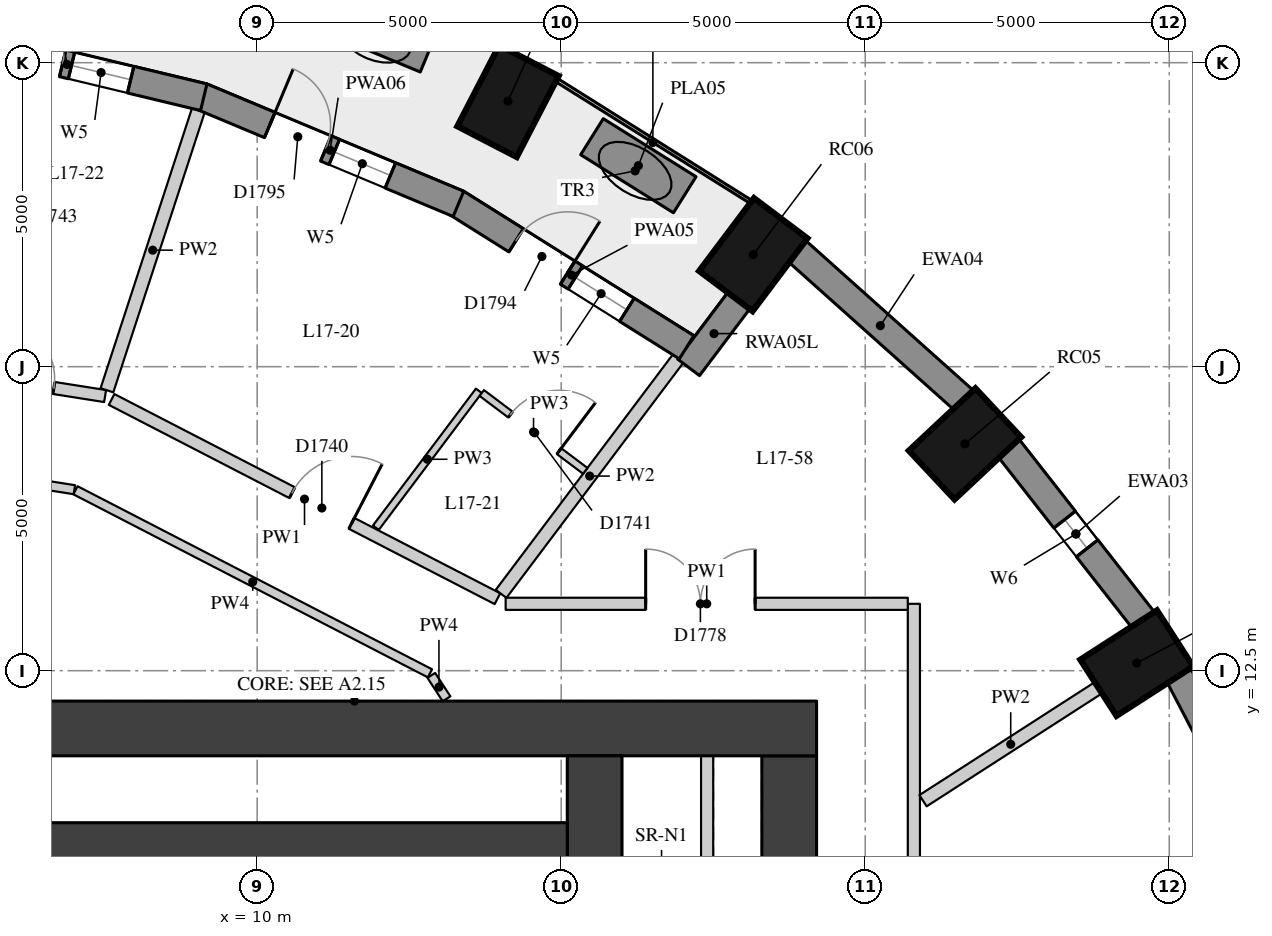
"""IFC4 building model, lengths in metres.
Left out: names, types, materials, properties, quantities, classifications, styles, units other than length and angle.
Written with IfcOpenShell. Run it as: python <this file> out.ifc"""

import sys

from ifc_helpers import new_model, si_unit, direction, frame, frame_2d, origin, origin_2d, place, context, subcontext, project, spatial, rectangle, extrude, element, fill, save


model = new_model("IFC4")
c1 = context("Model", 3, precision=1e-05, world=origin(), true_north=direction((0.0, 1.0)))
c2 = subcontext(c1, "Body", "Model", "MODEL_VIEW")
j1 = project(units=[si_unit("LENGTHUNIT", "METRE"), si_unit("PLANEANGLEUNIT", "RADIAN")], contexts=[c1])
p1 = place(None, origin())
s1 = spatial("IfcSite", under=j1, at=p1, CompositionType="ELEMENT")
p2 = place(p1, origin())
s2 = spatial("IfcBuilding", under=s1, at=p2, CompositionType="ELEMENT")
p3 = place(p2, frame((0.0, 0.0, 64.6)))
s3 = spatial("IfcBuildingStorey", under=s2, at=p3, CompositionType="ELEMENT", Elevation=64.6)
for number, where, z_axis, x_axis in (
    (1, (24.465, 12.625, 0.0), (0.0, 0.0, 1.0), (0.841, 0.541, 0.0)),
    (2, (21.641, 16.23, 0.0), (0.0, 0.0, 1.0), (0.73, 0.683, 0.0)),
    (3, (18.159, 19.343, 0.0), (0.0, 0.0, 1.0), (0.601, 0.799, 0.0)),
    (4, (14.125, 21.867, 0.0), (0.0, 0.0, 1.0), (0.46, 0.888, 0.0)),
):
    element("IfcColumn", number, at=place(p3, frame(where, z_axis=z_axis, x_axis=x_axis)), inside=s3, PredefinedType="COLUMN", context=c2, shape_type="SweptSolid", body=[
        extrude(rectangle(XDim=1.5, YDim=1.1, at=origin_2d()), origin(), (0.0, 0.0, 1.0), 3.3),
    ])
p4 = place(p3, frame((26.786, 9.305, 0.0), z_axis=(0.0, 0.0, 1.0), x_axis=(-0.462492775226, 0.886623050041, 0.0)))
e5 = element("IfcWall", 5, at=p4, inside=s3, PredefinedType="SOLIDWALL", context=c2, shape_type="SweptSolid", body=[
    extrude(rectangle(XDim=3.532, YDim=0.45, at=frame_2d((1.766, 0.0))), origin(), (0.0, 0.0, 1.0), 3.02),
])
p5 = place(p3, frame((24.578, 13.328, 0.0), z_axis=(0.0, 0.0, 1.0), x_axis=(-0.616661975264, 0.787228053529, 0.0)))
e6 = element("IfcWall", 6, at=p5, inside=s3, PredefinedType="SOLIDWALL", context=c2, shape_type="SweptSolid", body=[
    extrude(rectangle(XDim=3.61, YDim=0.45, at=frame_2d((1.805, 0.0))), origin(), (0.0, 0.0, 1.0), 3.02),
])
p6 = place(p5, frame((1.505, 0.0, 0.4)))
e7 = element("IfcOpeningElement", 7, at=p6, cuts=e6, PredefinedType="OPENING", context=c2, shape_type="SweptSolid", body=[
    extrude(rectangle(XDim=0.6, YDim=1.75, at=frame_2d((0.3, 0.875))), frame((0.0, 0.235, 0.0), z_axis=(0.0, -1.0, 0.0), x_axis=(1.0, 0.0, 0.0)), (0.0, 0.0, 1.0), 0.47),
])
p7 = place(p3, frame((21.627, 16.943, 0.0), z_axis=(0.0, 0.0, 1.0), x_axis=(-0.745526233716, 0.66647628228, 0.0)))
e8 = element("IfcWall", 8, at=p7, inside=s3, PredefinedType="SOLIDWALL", context=c2, shape_type="SweptSolid", body=[
    extrude(rectangle(XDim=3.697, YDim=0.45, at=frame_2d((1.848, 0.0))), origin(), (0.0, 0.0, 1.0), 3.02),
])
p8 = place(p3, frame((17.932, 18.6, 0.0), z_axis=(0.0, 0.0, 1.0), x_axis=(-0.601262851241, -0.799051302306, 0.0)))
e9 = element("IfcWall", 9, at=p8, inside=s3, PredefinedType="SOLIDWALL", context=c2, shape_type="SweptSolid", body=[
    extrude(rectangle(XDim=1.391, YDim=0.45, at=frame_2d((0.696, 0.0))), origin(), (0.0, 0.0, 1.0), 3.02),
])
p9 = place(p3, frame((17.062, 17.819, 0.0), z_axis=(0.0, 0.0, 1.0), x_axis=(-0.846990101364, 0.531608660757, 0.0)))
e10 = element("IfcWall", 10, at=p9, inside=s3, PredefinedType="SOLIDWALL", context=c2, shape_type="SweptSolid", body=[
    extrude(rectangle(XDim=4.469, YDim=0.45, at=frame_2d((2.234, 0.0))), origin(), (0.0, 0.0, 1.0), 3.02),
])
p10 = place(p9, frame((1.159, 0.0, 0.4)))
e11 = element("IfcOpeningElement", 11, at=p10, cuts=e10, PredefinedType="OPENING", context=c2, shape_type="SweptSolid", body=[
    extrude(rectangle(XDim=1.0, YDim=1.75, at=frame_2d((0.5, 0.875))), frame((0.0, 0.235, 0.0), z_axis=(0.0, -1.0, 0.0), x_axis=(1.0, 0.0, 0.0)), (0.0, 0.0, 1.0), 0.47),
])
p11 = place(p9, frame((2.31, 0.0, 0.0)))
e12 = element("IfcOpeningElement", 12, at=p11, cuts=e10, PredefinedType="OPENING", context=c2, shape_type="SweptSolid", body=[
    extrude(rectangle(XDim=1.0, YDim=2.15, at=frame_2d((0.5, 1.075))), frame((0.0, 0.235, 0.0), z_axis=(0.0, -1.0, 0.0), x_axis=(1.0, 0.0, 0.0)), (0.0, 0.0, 1.0), 0.47),
])
p12 = place(p3, frame((13.31, 20.178, 0.0), z_axis=(0.0, 0.0, 1.0), x_axis=(-0.922634412489, 0.385675693935, 0.0)))
e13 = element("IfcWall", 13, at=p12, inside=s3, PredefinedType="SOLIDWALL", context=c2, shape_type="SweptSolid", body=[
    extrude(rectangle(XDim=4.577, YDim=0.45, at=frame_2d((2.288, 0.0))), origin(), (0.0, 0.0, 1.0), 3.02),
])
p13 = place(p12, frame((1.213, 0.0, 0.4)))
e14 = element("IfcOpeningElement", 14, at=p13, cuts=e13, PredefinedType="OPENING", context=c2, shape_type="SweptSolid", body=[
    extrude(rectangle(XDim=1.0, YDim=1.75, at=frame_2d((0.5, 0.875))), frame((0.0, 0.235, 0.0), z_axis=(0.0, -1.0, 0.0), x_axis=(1.0, 0.0, 0.0)), (0.0, 0.0, 1.0), 0.47),
])
p14 = place(p12, frame((2.363, 0.0, 0.0)))
e15 = element("IfcOpeningElement", 15, at=p14, cuts=e13, PredefinedType="OPENING", context=c2, shape_type="SweptSolid", body=[
    extrude(rectangle(XDim=1.0, YDim=2.15, at=frame_2d((0.5, 1.075))), frame((0.0, 0.235, 0.0), z_axis=(0.0, -1.0, 0.0), x_axis=(1.0, 0.0, 0.0)), (0.0, 0.0, 1.0), 0.47),
])
p15 = place(p3, frame((9.122, 21.932, 0.0), z_axis=(0.0, 0.0, 1.0), x_axis=(-0.972346547441, 0.233542697764, 0.0)))
e16 = element("IfcWall", 16, at=p15, inside=s3, PredefinedType="SOLIDWALL", context=c2, shape_type="SweptSolid", body=[
    extrude(rectangle(XDim=4.624, YDim=0.45, at=frame_2d((2.312, 0.0))), origin(), (0.0, 0.0, 1.0), 3.02),
])
p16 = place(p15, frame((1.237, 0.0, 0.4)))
e17 = element("IfcOpeningElement", 17, at=p16, cuts=e16, PredefinedType="OPENING", context=c2, shape_type="SweptSolid", body=[
    extrude(rectangle(XDim=1.0, YDim=1.75, at=frame_2d((0.5, 0.875))), frame((0.0, 0.235, 0.0), z_axis=(0.0, -1.0, 0.0), x_axis=(1.0, 0.0, 0.0)), (0.0, 0.0, 1.0), 0.47),
])
p17 = place(p15, frame((2.387, 0.0, 0.0)))
e18 = element("IfcOpeningElement", 18, at=p17, cuts=e16, PredefinedType="OPENING", context=c2, shape_type="SweptSolid", body=[
    extrude(rectangle(XDim=1.0, YDim=2.15, at=frame_2d((0.5, 1.075))), frame((0.0, 0.235, 0.0), z_axis=(0.0, -1.0, 0.0), x_axis=(1.0, 0.0, 0.0)), (0.0, 0.0, 1.0), 0.47),
])
p18 = place(p3, frame((17.032, 20.328, 0.0), z_axis=(0.0, 0.0, 1.0), x_axis=(-0.847609446823, 0.530620604252, 0.0)))
e19 = element("IfcWall", 19, at=p18, inside=s3, PredefinedType="USERDEFINED", context=c2, shape_type="SweptSolid", body=[
    extrude(rectangle(XDim=1.8, YDim=0.7, at=frame_2d((0.9, 0.0))), origin(), (0.0, 0.0, 1.0), 0.75),
])
p19 = place(p3, frame((12.817, 22.67, 0.0), z_axis=(0.0, 0.0, 1.0), x_axis=(-0.923000660042, 0.384798364811, 0.0)))
e20 = element("IfcWall", 20, at=p19, inside=s3, PredefinedType="USERDEFINED", context=c2, shape_type="SweptSolid", body=[
    extrude(rectangle(XDim=1.8, YDim=0.7, at=frame_2d((0.9, 0.0))), origin(), (0.0, 0.0, 1.0), 0.75),
])
p20 = place(p3, frame((18.75, -11.1, 0.0), z_axis=(0.0, 0.0, 1.0), x_axis=(0.0, 1.0, 0.0)))
e21 = element("IfcWall", 21, at=p20, inside=s3, PredefinedType="SHEAR", context=c2, shape_type="SweptSolid", body=[
    extrude(rectangle(XDim=22.2, YDim=0.9, at=frame_2d((11.1, 0.0))), origin(), (0.0, 0.0, 1.0), 3.02),
])
p21 = place(p20, frame((16.175, 0.0, 0.0)))
e22 = element("IfcOpeningElement", 22, at=p21, cuts=e21, PredefinedType="OPENING", context=c2, shape_type="SweptSolid", body=[
    extrude(rectangle(XDim=1.5, YDim=2.1, at=frame_2d((0.75, 1.05))), frame((0.0, 0.46, 0.0), z_axis=(0.0, -1.0, 0.0), x_axis=(1.0, 0.0, 0.0)), (0.0, 0.0, 1.0), 0.92),
])
p22 = place(p20, frame((5.025, 0.0, 0.0)))
e23 = element("IfcOpeningElement", 23, at=p22, cuts=e21, PredefinedType="OPENING", context=c2, shape_type="SweptSolid", body=[
    extrude(rectangle(XDim=1.5, YDim=2.1, at=frame_2d((0.75, 1.05))), frame((0.0, 0.46, 0.0), z_axis=(0.0, -1.0, 0.0), x_axis=(1.0, 0.0, 0.0)), (0.0, 0.0, 1.0), 0.92),
])
p23 = place(p3, frame((4.0, 11.55, 0.0), z_axis=(0.0, 0.0, 1.0), x_axis=(1.0, 0.0, 0.0)))
e24 = element("IfcWall", 24, at=p23, inside=s3, PredefinedType="SHEAR", context=c2, shape_type="SweptSolid", body=[
    extrude(rectangle(XDim=15.2, YDim=0.9, at=frame_2d((7.6, 0.0))), origin(), (0.0, 0.0, 1.0), 3.02),
])
p24 = place(p3, frame((15.55, -11.1, 0.0), z_axis=(0.0, 0.0, 1.0), x_axis=(0.0, 1.0, 0.0)))
e25 = element("IfcWall", 25, at=p24, inside=s3, PredefinedType="SHEAR", context=c2, shape_type="SweptSolid", body=[
    extrude(rectangle(XDim=22.2, YDim=0.9, at=frame_2d((11.1, 0.0))), origin(), (0.0, 0.0, 1.0), 3.02),
])
p25 = place(p24, frame((15.6, 0.0, 0.0)))
e26 = element("IfcOpeningElement", 26, at=p25, cuts=e25, PredefinedType="OPENING", context=c2, shape_type="SweptSolid", body=[
    extrude(rectangle(XDim=1.0, YDim=2.1, at=frame_2d((0.5, 1.05))), frame((0.0, 0.46, 0.0), z_axis=(0.0, -1.0, 0.0), x_axis=(1.0, 0.0, 0.0)), (0.0, 0.0, 1.0), 0.92),
])
p26 = place(p24, frame((5.6, 0.0, 0.0)))
e27 = element("IfcOpeningElement", 27, at=p26, cuts=e25, PredefinedType="OPENING", context=c2, shape_type="SweptSolid", body=[
    extrude(rectangle(XDim=1.0, YDim=2.1, at=frame_2d((0.5, 1.05))), frame((0.0, 0.46, 0.0), z_axis=(0.0, -1.0, 0.0), x_axis=(1.0, 0.0, 0.0)), (0.0, 0.0, 1.0), 0.92),
])
p27 = place(p3, frame((4.9, 9.55, 0.0), z_axis=(0.0, 0.0, 1.0), x_axis=(1.0, 0.0, 0.0)))
e28 = element("IfcWall", 28, at=p27, inside=s3, PredefinedType="SHEAR", context=c2, shape_type="SweptSolid", body=[
    extrude(rectangle(XDim=10.2, YDim=0.9, at=frame_2d((5.1, 0.0))), origin(), (0.0, 0.0, 1.0), 3.02),
])
p28 = place(p3, frame((17.4, 7.4, 0.0), z_axis=(0.0, 0.0, 1.0), x_axis=(0.0, 1.0, 0.0)))
e29 = element("IfcWall", 29, at=p28, inside=s3, PredefinedType="PARTITIONING", context=c2, shape_type="SweptSolid", body=[
    extrude(rectangle(XDim=3.7, YDim=0.2, at=frame_2d((1.85, 0.0))), origin(), (0.0, 0.0, 1.0), 3.02),
])
p29 = place(p3, frame((20.8, 13.6, 0.0), z_axis=(0.0, 0.0, 1.0), x_axis=(0.0, -1.0, 0.0)))
e30 = element("IfcWall", 30, at=p29, inside=s3, PredefinedType="PARTITIONING", context=c2, shape_type="SweptSolid", body=[
    extrude(rectangle(XDim=10.428, YDim=0.2, at=frame_2d((5.214, 0.0))), origin(), (0.0, 0.0, 1.0), 3.02),
])
p30 = place(p29, frame((5.976, 0.0, 0.0)))
e31 = element("IfcOpeningElement", 31, at=p30, cuts=e30, PredefinedType="OPENING", context=c2, shape_type="SweptSolid", body=[
    extrude(rectangle(XDim=1.8, YDim=2.1, at=frame_2d((0.9, 1.05))), frame((0.0, 0.11, 0.0), z_axis=(0.0, -1.0, 0.0), x_axis=(1.0, 0.0, 0.0)), (0.0, 0.0, 1.0), 0.22),
])
p31 = place(p3, frame((0.119, 18.181, 0.0), z_axis=(0.0, 0.0, 1.0), x_axis=(0.987788122462, -0.155803161464, 0.0)))
e32 = element("IfcWall", 32, at=p31, inside=s3, PredefinedType="PARTITIONING", context=c2, shape_type="SweptSolid", body=[
    extrude(rectangle(XDim=7.471, YDim=0.2, at=frame_2d((3.736, 0.0))), origin(), (0.0, 0.0, 1.0), 3.02),
])
p32 = place(p31, frame((5.619, 0.0, 0.0)))
e33 = element("IfcOpeningElement", 33, at=p32, cuts=e32, PredefinedType="OPENING", context=c2, shape_type="SweptSolid", body=[
    extrude(rectangle(XDim=1.0, YDim=2.1, at=frame_2d((0.5, 1.05))), frame((0.0, 0.11, 0.0), z_axis=(0.0, -1.0, 0.0), x_axis=(1.0, 0.0, 0.0)), (0.0, 0.0, 1.0), 0.22),
])
p33 = place(p31, frame((0.732, 0.0, 0.0)))
e34 = element("IfcOpeningElement", 34, at=p33, cuts=e32, PredefinedType="OPENING", context=c2, shape_type="SweptSolid", body=[
    extrude(rectangle(XDim=1.0, YDim=2.1, at=frame_2d((0.5, 1.05))), frame((0.0, 0.11, 0.0), z_axis=(0.0, -1.0, 0.0), x_axis=(1.0, 0.0, 0.0)), (0.0, 0.0, 1.0), 0.22),
])
p34 = place(p3, frame((7.606, 16.961, 0.0), z_axis=(0.0, 0.0, 1.0), x_axis=(0.888519518851, -0.45883882205, 0.0)))
e35 = element("IfcWall", 35, at=p34, inside=s3, PredefinedType="PARTITIONING", context=c2, shape_type="SweptSolid", body=[
    extrude(rectangle(XDim=7.142, YDim=0.2, at=frame_2d((3.571, 0.0))), origin(), (0.0, 0.0, 1.0), 3.02),
])
p35 = place(p34, frame((3.342, 0.0, 0.0)))
e36 = element("IfcOpeningElement", 36, at=p35, cuts=e35, PredefinedType="OPENING", context=c2, shape_type="SweptSolid", body=[
    extrude(rectangle(XDim=1.1, YDim=2.1, at=frame_2d((0.55, 1.05))), frame((0.0, 0.11, 0.0), z_axis=(0.0, -1.0, 0.0), x_axis=(1.0, 0.0, 0.0)), (0.0, 0.0, 1.0), 0.22),
])
p36 = place(p3, frame((14.086, 13.6, 0.0), z_axis=(0.0, 0.0, 1.0), x_axis=(1.0, 0.0, 0.0)))
e37 = element("IfcWall", 37, at=p36, inside=s3, PredefinedType="PARTITIONING", context=c2, shape_type="SweptSolid", body=[
    extrude(rectangle(XDim=6.614, YDim=0.2, at=frame_2d((3.307, 0.0))), origin(), (0.0, 0.0, 1.0), 3.02),
])
p37 = place(p36, frame((2.303, 0.0, 0.0)))
e38 = element("IfcOpeningElement", 38, at=p37, cuts=e37, PredefinedType="OPENING", context=c2, shape_type="SweptSolid", body=[
    extrude(rectangle(XDim=1.8, YDim=2.1, at=frame_2d((0.9, 1.05))), frame((0.0, 0.11, 0.0), z_axis=(0.0, -1.0, 0.0), x_axis=(1.0, 0.0, 0.0)), (0.0, 0.0, 1.0), 0.22),
])
p38 = place(p3, frame((0.083, 16.567, 0.0), z_axis=(0.0, 0.0, 1.0), x_axis=(0.987781067139, -0.15584788546, 0.0)))
e39 = element("IfcWall", 39, at=p38, inside=s3, PredefinedType="PARTITIONING", context=c2, shape_type="SweptSolid", body=[
    extrude(rectangle(XDim=6.996, YDim=0.15, at=frame_2d((3.498, 0.0))), origin(), (0.0, 0.0, 1.0), 3.02),
])
p39 = place(p3, frame((7.012, 15.467, 0.0), z_axis=(0.0, 0.0, 1.0), x_axis=(0.888509096081, -0.458859004685, 0.0)))
e40 = element("IfcWall", 40, at=p39, inside=s3, PredefinedType="PARTITIONING", context=c2, shape_type="SweptSolid", body=[
    extrude(rectangle(XDim=6.561, YDim=0.15, at=frame_2d((3.281, 0.0))), origin(), (0.0, 0.0, 1.0), 3.02),
])
p40 = place(p3, frame((12.864, 12.423, 0.0), z_axis=(0.0, 0.0, 1.0), x_axis=(0.545733799108, -0.837958603101, 0.0)))
e41 = element("IfcWall", 41, at=p40, inside=s3, PredefinedType="PARTITIONING", context=c2, shape_type="SweptSolid", body=[
    extrude(rectangle(XDim=0.46, YDim=0.15, at=frame_2d((0.23, 0.0))), origin(), (0.0, 0.0, 1.0), 3.02),
])
p41 = place(p3, frame((23.835, 12.219, 0.0), z_axis=(0.0, 0.0, 1.0), x_axis=(-0.840694872373, -0.541509124176, 0.0)))
e42 = element("IfcWall", 42, at=p41, inside=s3, PredefinedType="PARTITIONING", context=c2, shape_type="SweptSolid", body=[
    extrude(rectangle(XDim=3.43, YDim=0.22, at=frame_2d((1.715, 0.0))), origin(), (0.0, 0.0, 1.0), 3.02),
])
p42 = place(p3, frame((16.927, 17.638, 0.0), z_axis=(0.0, 0.0, 1.0), x_axis=(-0.601159395391, -0.799129139334, 0.0)))
e43 = element("IfcWall", 43, at=p42, inside=s3, PredefinedType="PARTITIONING", context=c2, shape_type="SweptSolid", body=[
    extrude(rectangle(XDim=4.849, YDim=0.22, at=frame_2d((2.425, 0.0))), origin(), (0.0, 0.0, 1.0), 3.02),
])
p43 = place(p3, frame((9.034, 21.721, 0.0), z_axis=(0.0, 0.0, 1.0), x_axis=(-0.310330277344, -0.95062880188, 0.0)))
e44 = element("IfcWall", 44, at=p43, inside=s3, PredefinedType="PARTITIONING", context=c2, shape_type="SweptSolid", body=[
    extrude(rectangle(XDim=4.848, YDim=0.22, at=frame_2d((2.424, 0.0))), origin(), (0.0, 0.0, 1.0), 3.02),
])
p44 = place(p3, frame((11.952, 14.852, 0.0), z_axis=(0.0, 0.0, 1.0), x_axis=(0.60115003842, 0.7991361782, 0.0)))
e45 = element("IfcWall", 45, at=p44, inside=s3, PredefinedType="PARTITIONING", context=c2, shape_type="SweptSolid", body=[
    extrude(rectangle(XDim=2.818, YDim=0.12, at=frame_2d((1.409, 0.0))), origin(), (0.0, 0.0, 1.0), 3.02),
])
p45 = place(p3, frame((13.694, 17.067, 0.0), z_axis=(0.0, 0.0, 1.0), x_axis=(0.799118870394, -0.601173045786, 0.0)))
e46 = element("IfcWall", 46, at=p45, inside=s3, PredefinedType="PARTITIONING", context=c2, shape_type="SweptSolid", body=[
    extrude(rectangle(XDim=2.13, YDim=0.12, at=frame_2d((1.065, 0.0))), origin(), (0.0, 0.0, 1.0), 3.02),
])
p46 = place(p45, frame((0.59, 0.0, 0.0)))
e47 = element("IfcOpeningElement", 47, at=p46, cuts=e46, PredefinedType="OPENING", context=c2, shape_type="SweptSolid", body=[
    extrude(rectangle(XDim=1.0, YDim=2.1, at=frame_2d((0.5, 1.05))), frame((0.0, 0.07, 0.0), z_axis=(0.0, -1.0, 0.0), x_axis=(1.0, 0.0, 0.0)), (0.0, 0.0, 1.0), 0.14),
])
p47 = place(p6, origin())
e48 = element("IfcWindow", 48, at=p47, inside=s3, PartitioningType="SINGLE_PANEL", PredefinedType="WINDOW", context=c2, shape_type="SweptSolid", body=[
    extrude(rectangle(XDim=0.6, YDim=1.75, at=frame_2d((0.3, 0.875))), frame((0.0, 0.035, 0.0), z_axis=(0.0, -1.0, 0.0), x_axis=(1.0, 0.0, 0.0)), (0.0, 0.0, 1.0), 0.06),
])
fill(e7, e48)
p48 = place(p10, origin())
e49 = element("IfcWindow", 49, at=p48, inside=s3, PartitioningType="SINGLE_PANEL", PredefinedType="WINDOW", context=c2, shape_type="SweptSolid", body=[
    extrude(rectangle(XDim=1.0, YDim=1.75, at=frame_2d((0.5, 0.875))), frame((0.0, 0.035, 0.0), z_axis=(0.0, -1.0, 0.0), x_axis=(1.0, 0.0, 0.0)), (0.0, 0.0, 1.0), 0.06),
])
fill(e11, e49)
p49 = place(p11, frame((1.0, 0.0, 0.0), z_axis=(0.0, 0.0, 1.0), x_axis=(-1.0, 0.0, 0.0)))
e50 = element("IfcDoor", 50, at=p49, inside=s3, OperationType="SINGLE_SWING_RIGHT", PredefinedType="DOOR", context=c2, shape_type="SweptSolid", body=[
    extrude(rectangle(XDim=1.0, YDim=2.15, at=frame_2d((0.5, 1.075))), frame((0.0, 0.075, 0.0), z_axis=(0.0, -1.0, 0.0), x_axis=(1.0, 0.0, 0.0)), (0.0, 0.0, 1.0), 0.05),
])
fill(e12, e50)
p50 = place(p13, origin())
e51 = element("IfcWindow", 51, at=p50, inside=s3, PartitioningType="SINGLE_PANEL", PredefinedType="WINDOW", context=c2, shape_type="SweptSolid", body=[
    extrude(rectangle(XDim=1.0, YDim=1.75, at=frame_2d((0.5, 0.875))), frame((0.0, 0.035, 0.0), z_axis=(0.0, -1.0, 0.0), x_axis=(1.0, 0.0, 0.0)), (0.0, 0.0, 1.0), 0.06),
])
fill(e14, e51)
p51 = place(p14, frame((1.0, 0.0, 0.0), z_axis=(0.0, 0.0, 1.0), x_axis=(-1.0, 0.0, 0.0)))
e52 = element("IfcDoor", 52, at=p51, inside=s3, OperationType="SINGLE_SWING_LEFT", PredefinedType="DOOR", context=c2, shape_type="SweptSolid", body=[
    extrude(rectangle(XDim=1.0, YDim=2.15, at=frame_2d((0.5, 1.075))), frame((0.0, 0.075, 0.0), z_axis=(0.0, -1.0, 0.0), x_axis=(1.0, 0.0, 0.0)), (0.0, 0.0, 1.0), 0.05),
])
fill(e15, e52)
p52 = place(p16, origin())
e53 = element("IfcWindow", 53, at=p52, inside=s3, PartitioningType="SINGLE_PANEL", PredefinedType="WINDOW", context=c2, shape_type="SweptSolid", body=[
    extrude(rectangle(XDim=1.0, YDim=1.75, at=frame_2d((0.5, 0.875))), frame((0.0, 0.035, 0.0), z_axis=(0.0, -1.0, 0.0), x_axis=(1.0, 0.0, 0.0)), (0.0, 0.0, 1.0), 0.06),
])
fill(e17, e53)
p53 = place(p17, frame((1.0, 0.0, 0.0), z_axis=(0.0, 0.0, 1.0), x_axis=(-1.0, 0.0, 0.0)))
e54 = element("IfcDoor", 54, at=p53, inside=s3, OperationType="SINGLE_SWING_LEFT", PredefinedType="DOOR", context=c2, shape_type="SweptSolid", body=[
    extrude(rectangle(XDim=1.0, YDim=2.15, at=frame_2d((0.5, 1.075))), frame((0.0, 0.075, 0.0), z_axis=(0.0, -1.0, 0.0), x_axis=(1.0, 0.0, 0.0)), (0.0, 0.0, 1.0), 0.05),
])
fill(e18, e54)
p54 = place(p35, origin())
e55 = element("IfcDoor", 55, at=p54, inside=s3, OperationType="SINGLE_SWING_RIGHT", PredefinedType="DOOR", context=c2, shape_type="SweptSolid", body=[
    extrude(rectangle(XDim=1.1, YDim=2.1, at=frame_2d((0.55, 1.05))), frame((0.0, 0.025, 0.0), z_axis=(0.0, -1.0, 0.0), x_axis=(1.0, 0.0, 0.0)), (0.0, 0.0, 1.0), 0.05),
])
fill(e36, e55)
p55 = place(p46, origin())
e56 = element("IfcDoor", 56, at=p55, inside=s3, OperationType="SINGLE_SWING_RIGHT", PredefinedType="DOOR", context=c2, shape_type="SweptSolid", body=[
    extrude(rectangle(XDim=1.0, YDim=2.1, at=frame_2d((0.5, 1.05))), frame((0.0, 0.025, 0.0), z_axis=(0.0, -1.0, 0.0), x_axis=(1.0, 0.0, 0.0)), (0.0, 0.0, 1.0), 0.05),
])
fill(e47, e56)
p56 = place(p32, origin())
e57 = element("IfcDoor", 57, at=p56, inside=s3, OperationType="SINGLE_SWING_LEFT", PredefinedType="DOOR", context=c2, shape_type="SweptSolid", body=[
    extrude(rectangle(XDim=1.0, YDim=2.1, at=frame_2d((0.5, 1.05))), frame((0.0, 0.025, 0.0), z_axis=(0.0, -1.0, 0.0), x_axis=(1.0, 0.0, 0.0)), (0.0, 0.0, 1.0), 0.05),
])
fill(e33, e57)
p57 = place(p37, origin())
e58 = element("IfcDoor", 58, at=p57, inside=s3, OperationType="DOUBLE_DOOR_SINGLE_SWING", PredefinedType="DOOR", context=c2, shape_type="SweptSolid", body=[
    extrude(rectangle(XDim=1.8, YDim=2.1, at=frame_2d((0.9, 1.05))), frame((0.0, 0.025, 0.0), z_axis=(0.0, -1.0, 0.0), x_axis=(1.0, 0.0, 0.0)), (0.0, 0.0, 1.0), 0.05),
])
fill(e38, e58)
save(model, sys.argv[1])
